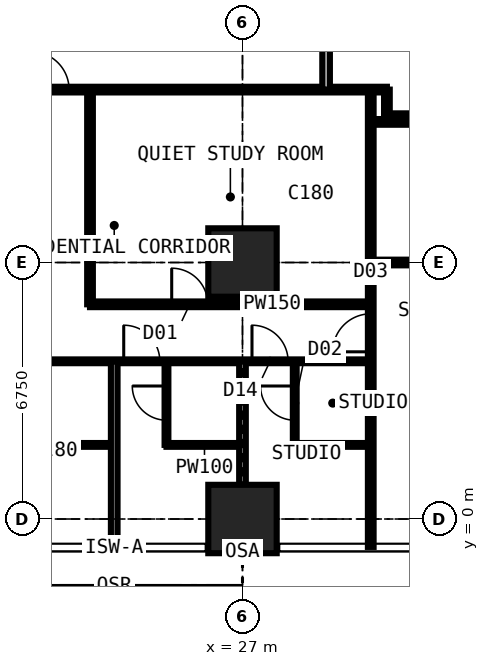
"""IFC4 building model, lengths in metres.
Left out: names, types, materials, properties, quantities, classifications, styles, units other than length and angle.
Written with IfcOpenShell. Run it as: python <this file> out.ifc"""

import sys

from ifc_helpers import new_model, si_unit, direction, frame, frame_2d, origin, origin_2d, place, context, subcontext, project, spatial, rectangle, extrude, element, fill, save


model = new_model("IFC4")
c1 = context("Model", 3, precision=1e-05, world=origin(), true_north=direction((0.0, 1.0)))
c2 = subcontext(c1, "Body", "Model", "MODEL_VIEW")
j1 = project(units=[si_unit("LENGTHUNIT", "METRE"), si_unit("PLANEANGLEUNIT", "RADIAN")], contexts=[c1])
p1 = place(None, origin())
s1 = spatial("IfcSite", under=j1, at=p1, CompositionType="ELEMENT")
p2 = place(p1, origin())
s2 = spatial("IfcBuilding", under=s1, at=p2, CompositionType="ELEMENT")
p3 = place(p2, frame((0.0, 0.0, 61.2)))
s3 = spatial("IfcBuildingStorey", under=s2, at=p3, CompositionType="ELEMENT", Elevation=61.2)
for number, where, z_axis, x_axis in (
    (1, (27.0, 0.0, 0.0), (0.0, 0.0, 1.0), (1.0, 0.0, 0.0)),
    (2, (27.0, 6.75, 0.0), (0.0, 0.0, 1.0), (1.0, 0.0, 0.0)),
):
    element("IfcColumn", number, at=place(p3, frame(where, z_axis=z_axis, x_axis=x_axis)), inside=s3, PredefinedType="COLUMN", context=c2, shape_type="SweptSolid", body=[
        extrude(rectangle(XDim=1.8, YDim=1.8, at=origin_2d()), origin(), (0.0, 0.0, 1.0), 3.6),
    ])
p4 = place(p3, frame((6.75, 4.15, 0.0), z_axis=(0.0, 0.0, 1.0), x_axis=(1.0, 0.0, 0.0)))
e3 = element("IfcWall", 3, at=p4, inside=s3, PredefinedType="PARTITIONING", context=c2, shape_type="SweptSolid", body=[
    extrude(rectangle(XDim=23.625, YDim=0.1, at=frame_2d((11.812, 0.0))), origin(), (0.0, 0.0, 1.0), 3.375),
])
p5 = place(p4, frame((0.2, 0.0, 0.0)))
e4 = element("IfcOpeningElement", 4, at=p5, cuts=e3, PredefinedType="OPENING", context=c2, shape_type="SweptSolid", body=[
    extrude(rectangle(XDim=0.95, YDim=2.2, at=frame_2d((0.475, 1.1))), frame((0.0, 0.06, 0.0), z_axis=(0.0, -1.0, 0.0), x_axis=(1.0, 0.0, 0.0)), (0.0, 0.0, 1.0), 0.12),
])
p6 = place(p4, frame((3.625, 0.0, 0.0)))
e5 = element("IfcOpeningElement", 5, at=p6, cuts=e3, PredefinedType="OPENING", context=c2, shape_type="SweptSolid", body=[
    extrude(rectangle(XDim=0.95, YDim=2.2, at=frame_2d((0.475, 1.1))), frame((0.0, 0.06, 0.0), z_axis=(0.0, -1.0, 0.0), x_axis=(1.0, 0.0, 0.0)), (0.0, 0.0, 1.0), 0.12),
])
p7 = place(p4, frame((7.0, 0.0, 0.0)))
e6 = element("IfcOpeningElement", 6, at=p7, cuts=e3, PredefinedType="OPENING", context=c2, shape_type="SweptSolid", body=[
    extrude(rectangle(XDim=0.95, YDim=2.2, at=frame_2d((0.475, 1.1))), frame((0.0, 0.06, 0.0), z_axis=(0.0, -1.0, 0.0), x_axis=(1.0, 0.0, 0.0)), (0.0, 0.0, 1.0), 0.12),
])
p8 = place(p4, frame((10.325, 0.0, 0.0)))
e7 = element("IfcOpeningElement", 7, at=p8, cuts=e3, PredefinedType="OPENING", context=c2, shape_type="SweptSolid", body=[
    extrude(rectangle(XDim=0.95, YDim=2.2, at=frame_2d((0.475, 1.1))), frame((0.0, 0.06, 0.0), z_axis=(0.0, -1.0, 0.0), x_axis=(1.0, 0.0, 0.0)), (0.0, 0.0, 1.0), 0.12),
])
p9 = place(p4, frame((13.75, 0.0, 0.0)))
e8 = element("IfcOpeningElement", 8, at=p9, cuts=e3, PredefinedType="OPENING", context=c2, shape_type="SweptSolid", body=[
    extrude(rectangle(XDim=0.95, YDim=2.2, at=frame_2d((0.475, 1.1))), frame((0.0, 0.06, 0.0), z_axis=(0.0, -1.0, 0.0), x_axis=(1.0, 0.0, 0.0)), (0.0, 0.0, 1.0), 0.12),
])
p10 = place(p4, frame((17.125, 0.0, 0.0)))
e9 = element("IfcOpeningElement", 9, at=p10, cuts=e3, PredefinedType="OPENING", context=c2, shape_type="SweptSolid", body=[
    extrude(rectangle(XDim=0.95, YDim=2.2, at=frame_2d((0.475, 1.1))), frame((0.0, 0.06, 0.0), z_axis=(0.0, -1.0, 0.0), x_axis=(1.0, 0.0, 0.0)), (0.0, 0.0, 1.0), 0.12),
])
p11 = place(p4, frame((20.5, 0.0, 0.0)))
e10 = element("IfcOpeningElement", 10, at=p11, cuts=e3, PredefinedType="OPENING", context=c2, shape_type="SweptSolid", body=[
    extrude(rectangle(XDim=0.95, YDim=2.2, at=frame_2d((0.475, 1.1))), frame((0.0, 0.06, 0.0), z_axis=(0.0, -1.0, 0.0), x_axis=(1.0, 0.0, 0.0)), (0.0, 0.0, 1.0), 0.12),
])
p12 = place(p3, frame((10.125, 11.3, 0.0), z_axis=(0.0, 0.0, 1.0), x_axis=(1.0, 0.0, 0.0)))
e11 = element("IfcWall", 11, at=p12, inside=s3, PredefinedType="PARTITIONING", context=c2, shape_type="SweptSolid", body=[
    extrude(rectangle(XDim=20.675, YDim=0.15, at=frame_2d((10.337, 0.0))), origin(), (0.0, 0.0, 1.0), 3.375),
])
p13 = place(p12, frame((5.2, 0.0, 0.0)))
e12 = element("IfcOpeningElement", 12, at=p13, cuts=e11, PredefinedType="OPENING", context=c2, shape_type="SweptSolid", body=[
    extrude(rectangle(XDim=1.0, YDim=2.2, at=frame_2d((0.5, 1.1))), frame((0.0, 0.085, 0.0), z_axis=(0.0, -1.0, 0.0), x_axis=(1.0, 0.0, 0.0)), (0.0, 0.0, 1.0), 0.17),
])
p14 = place(p12, frame((11.312, 0.0, 0.0)))
e13 = element("IfcOpeningElement", 13, at=p14, cuts=e11, PredefinedType="OPENING", context=c2, shape_type="SweptSolid", body=[
    extrude(rectangle(XDim=1.0, YDim=2.2, at=frame_2d((0.5, 1.1))), frame((0.0, 0.085, 0.0), z_axis=(0.0, -1.0, 0.0), x_axis=(1.0, 0.0, 0.0)), (0.0, 0.0, 1.0), 0.17),
])
p15 = place(p12, frame((2.425, 0.0, 0.0)))
e14 = element("IfcOpeningElement", 14, at=p15, cuts=e11, PredefinedType="OPENING", context=c2, shape_type="SweptSolid", body=[
    extrude(rectangle(XDim=0.95, YDim=2.2, at=frame_2d((0.475, 1.1))), frame((0.0, 0.085, 0.0), z_axis=(0.0, -1.0, 0.0), x_axis=(1.0, 0.0, 0.0)), (0.0, 0.0, 1.0), 0.17),
])
p16 = place(p3, frame((21.625, 1.95, 0.0), z_axis=(0.0, 0.0, 1.0), x_axis=(1.0, 0.0, 0.0)))
e15 = element("IfcWall", 15, at=p16, inside=s3, PredefinedType="PARTITIONING", context=c2, shape_type="SweptSolid", body=[
    extrude(rectangle(XDim=2.0, YDim=0.1, at=frame_2d((1.0, 0.0))), origin(), (0.0, 0.0, 1.0), 3.375),
])
p17 = place(p3, frame((22.988, 5.65, 0.0), z_axis=(0.0, 0.0, 1.0), x_axis=(1.0, 0.0, 0.0)))
e16 = element("IfcWall", 16, at=p17, inside=s3, PredefinedType="PARTITIONING", context=c2, shape_type="SweptSolid", body=[
    extrude(rectangle(XDim=7.387, YDim=0.15, at=frame_2d((3.694, 0.0))), origin(), (0.0, 0.0, 1.0), 3.375),
])
p18 = place(p17, frame((2.15, 0.0, 0.0)))
e17 = element("IfcOpeningElement", 17, at=p18, cuts=e16, PredefinedType="OPENING", context=c2, shape_type="SweptSolid", body=[
    extrude(rectangle(XDim=0.95, YDim=2.2, at=frame_2d((0.475, 1.1))), frame((0.0, 0.085, 0.0), z_axis=(0.0, -1.0, 0.0), x_axis=(1.0, 0.0, 0.0)), (0.0, 0.0, 1.0), 0.17),
])
p19 = place(p3, frame((22.988, 5.65, 0.0), z_axis=(0.0, 0.0, 1.0), x_axis=(0.0, 1.0, 0.0)))
e18 = element("IfcWall", 18, at=p19, inside=s3, PredefinedType="PARTITIONING", context=c2, shape_type="SweptSolid", body=[
    extrude(rectangle(XDim=5.65, YDim=0.15, at=frame_2d((2.825, 0.0))), origin(), (0.0, 0.0, 1.0), 3.375),
])
p20 = place(p3, frame((23.625, -0.734, 0.0), z_axis=(0.0, 0.0, 1.0), x_axis=(0.0, 1.0, 0.0)))
e19 = element("IfcWall", 19, at=p20, inside=s3, PredefinedType="PARTITIONING", context=c2, shape_type="SweptSolid", body=[
    extrude(rectangle(XDim=4.884, YDim=0.175, at=frame_2d((2.442, 0.0))), origin(), (0.0, 0.0, 1.0), 3.375),
])
p21 = place(p3, frame((25.0, 1.95, 0.0), z_axis=(0.0, 0.0, 1.0), x_axis=(0.0, 1.0, 0.0)))
e20 = element("IfcWall", 20, at=p21, inside=s3, PredefinedType="PARTITIONING", context=c2, shape_type="SweptSolid", body=[
    extrude(rectangle(XDim=2.2, YDim=0.1, at=frame_2d((1.1, 0.0))), origin(), (0.0, 0.0, 1.0), 3.375),
])
p22 = place(p21, frame((0.65, 0.0, 0.0)))
e21 = element("IfcOpeningElement", 21, at=p22, cuts=e20, PredefinedType="OPENING", context=c2, shape_type="SweptSolid", body=[
    extrude(rectangle(XDim=0.9, YDim=2.2, at=frame_2d((0.45, 1.1))), frame((0.0, 0.06, 0.0), z_axis=(0.0, -1.0, 0.0), x_axis=(1.0, 0.0, 0.0)), (0.0, 0.0, 1.0), 0.12),
])
p23 = place(p3, frame((25.0, 1.95, 0.0), z_axis=(0.0, 0.0, 1.0), x_axis=(1.0, 0.0, 0.0)))
e22 = element("IfcWall", 22, at=p23, inside=s3, PredefinedType="PARTITIONING", context=c2, shape_type="SweptSolid", body=[
    extrude(rectangle(XDim=2.0, YDim=0.1, at=frame_2d((1.0, 0.0))), origin(), (0.0, 0.0, 1.0), 3.375),
])
p24 = place(p3, frame((27.0, -0.734, 0.0), z_axis=(0.0, 0.0, 1.0), x_axis=(0.0, 1.0, 0.0)))
e23 = element("IfcWall", 23, at=p24, inside=s3, PredefinedType="PARTITIONING", context=c2, shape_type="SweptSolid", body=[
    extrude(rectangle(XDim=4.884, YDim=0.175, at=frame_2d((2.442, 0.0))), origin(), (0.0, 0.0, 1.0), 2.61),
])
p25 = place(p3, frame((28.375, 1.95, 0.0), z_axis=(0.0, 0.0, 1.0), x_axis=(0.0, 1.0, 0.0)))
e24 = element("IfcWall", 24, at=p25, inside=s3, PredefinedType="PARTITIONING", context=c2, shape_type="SweptSolid", body=[
    extrude(rectangle(XDim=2.2, YDim=0.1, at=frame_2d((1.1, 0.0))), origin(), (0.0, 0.0, 1.0), 3.375),
])
p26 = place(p25, frame((0.65, 0.0, 0.0)))
e25 = element("IfcOpeningElement", 25, at=p26, cuts=e24, PredefinedType="OPENING", context=c2, shape_type="SweptSolid", body=[
    extrude(rectangle(XDim=0.9, YDim=2.2, at=frame_2d((0.45, 1.1))), frame((0.0, 0.06, 0.0), z_axis=(0.0, -1.0, 0.0), x_axis=(1.0, 0.0, 0.0)), (0.0, 0.0, 1.0), 0.12),
])
p27 = place(p3, frame((28.375, 1.95, 0.0), z_axis=(0.0, 0.0, 1.0), x_axis=(1.0, 0.0, 0.0)))
e26 = element("IfcWall", 26, at=p27, inside=s3, PredefinedType="PARTITIONING", context=c2, shape_type="SweptSolid", body=[
    extrude(rectangle(XDim=2.0, YDim=0.1, at=frame_2d((1.0, 0.0))), origin(), (0.0, 0.0, 1.0), 3.375),
])
p28 = place(p3, frame((29.2, 11.3, 0.0), z_axis=(0.0, 0.0, 1.0), x_axis=(0.0, 1.0, 0.0)))
e27 = element("IfcWall", 27, at=p28, inside=s3, PredefinedType="PARTITIONING", context=c2, shape_type="SweptSolid", body=[
    extrude(rectangle(XDim=17.9, YDim=0.2, at=frame_2d((8.95, 0.0))), origin(), (0.0, 0.0, 1.0), 3.375),
])
p29 = place(p28, frame((8.35, 0.0, 0.0)))
e28 = element("IfcOpeningElement", 28, at=p29, cuts=e27, PredefinedType="OPENING", context=c2, shape_type="SweptSolid", body=[
    extrude(rectangle(XDim=1.2, YDim=2.2, at=frame_2d((0.6, 1.1))), frame((0.0, 0.11, 0.0), z_axis=(0.0, -1.0, 0.0), x_axis=(1.0, 0.0, 0.0)), (0.0, 0.0, 1.0), 0.22),
])
p30 = place(p3, frame((30.375, -0.734, 0.0), z_axis=(0.0, 0.0, 1.0), x_axis=(0.0, 1.0, 0.0)))
e29 = element("IfcWall", 29, at=p30, inside=s3, PredefinedType="PARTITIONING", context=c2, shape_type="SweptSolid", body=[
    extrude(rectangle(XDim=12.034, YDim=0.15, at=frame_2d((6.017, 0.0))), origin(), (0.0, 0.0, 1.0), 3.375),
])
p31 = place(p30, frame((5.134, 0.0, 0.0)))
e30 = element("IfcOpeningElement", 30, at=p31, cuts=e29, PredefinedType="OPENING", context=c2, shape_type="SweptSolid", body=[
    extrude(rectangle(XDim=1.0, YDim=2.2, at=frame_2d((0.5, 1.1))), frame((0.0, 0.085, 0.0), z_axis=(0.0, -1.0, 0.0), x_axis=(1.0, 0.0, 0.0)), (0.0, 0.0, 1.0), 0.17),
])
p32 = place(p3, frame((30.375, 6.75, 0.0), z_axis=(0.0, 0.0, 1.0), x_axis=(1.0, 0.0, 0.0)))
e31 = element("IfcWall", 31, at=p32, inside=s3, PredefinedType="PARTITIONING", context=c2, shape_type="SweptSolid", body=[
    extrude(rectangle(XDim=5.975, YDim=0.15, at=frame_2d((2.988, 0.0))), origin(), (0.0, 0.0, 1.0), 2.877),
])
p33 = place(p3, frame((30.375, 10.45, 0.0), z_axis=(0.0, 0.0, 1.0), x_axis=(1.0, 0.0, 0.0)))
e32 = element("IfcWall", 32, at=p33, inside=s3, PredefinedType="PARTITIONING", context=c2, shape_type="SweptSolid", body=[
    extrude(rectangle(XDim=4.475, YDim=0.15, at=frame_2d((2.238, 0.0))), origin(), (0.0, 0.0, 1.0), 3.375),
])
p34 = place(p33, frame((2.35, 0.0, 0.0)))
e33 = element("IfcOpeningElement", 33, at=p34, cuts=e32, PredefinedType="OPENING", context=c2, shape_type="SweptSolid", body=[
    extrude(rectangle(XDim=0.95, YDim=2.2, at=frame_2d((0.475, 1.1))), frame((0.0, 0.085, 0.0), z_axis=(0.0, -1.0, 0.0), x_axis=(1.0, 0.0, 0.0)), (0.0, 0.0, 1.0), 0.17),
])
p35 = place(p3, frame((30.8, 10.6, 0.0), z_axis=(0.0, 0.0, 1.0), x_axis=(0.0, 1.0, 0.0)))
e34 = element("IfcWall", 34, at=p35, inside=s3, PredefinedType="PARTITIONING", context=c2, shape_type="SweptSolid", body=[
    extrude(rectangle(XDim=0.7, YDim=0.15, at=frame_2d((0.35, 0.0))), origin(), (0.0, 0.0, 1.0), 3.375),
])
p36 = place(p3, frame((30.8, 10.6, 0.0), z_axis=(0.0, 0.0, 1.0), x_axis=(1.0, 0.0, 0.0)))
e35 = element("IfcWall", 35, at=p36, inside=s3, PredefinedType="PARTITIONING", context=c2, shape_type="SweptSolid", body=[
    extrude(rectangle(XDim=1.85, YDim=0.15, at=frame_2d((0.925, 0.0))), origin(), (0.0, 0.0, 1.0), 3.375),
])
p37 = place(p10, origin())
e36 = element("IfcDoor", 36, at=p37, inside=s3, OperationType="SINGLE_SWING_LEFT", PredefinedType="DOOR", context=c2, shape_type="SweptSolid", body=[
    extrude(rectangle(XDim=0.95, YDim=2.2, at=frame_2d((0.475, 1.1))), frame((0.0, 0.025, 0.0), z_axis=(0.0, -1.0, 0.0), x_axis=(1.0, 0.0, 0.0)), (0.0, 0.0, 1.0), 0.05),
])
fill(e9, e36)
p38 = place(p22, origin())
e37 = element("IfcDoor", 37, at=p38, inside=s3, OperationType="SINGLE_SWING_RIGHT", PredefinedType="DOOR", context=c2, shape_type="SweptSolid", body=[
    extrude(rectangle(XDim=0.9, YDim=2.2, at=frame_2d((0.45, 1.1))), frame((0.0, 0.025, 0.0), z_axis=(0.0, -1.0, 0.0), x_axis=(1.0, 0.0, 0.0)), (0.0, 0.0, 1.0), 0.05),
])
fill(e21, e37)
p39 = place(p11, origin())
e38 = element("IfcDoor", 38, at=p39, inside=s3, OperationType="SINGLE_SWING_LEFT", PredefinedType="DOOR", context=c2, shape_type="SweptSolid", body=[
    extrude(rectangle(XDim=0.95, YDim=2.2, at=frame_2d((0.475, 1.1))), frame((0.0, 0.025, 0.0), z_axis=(0.0, -1.0, 0.0), x_axis=(1.0, 0.0, 0.0)), (0.0, 0.0, 1.0), 0.05),
])
fill(e10, e38)
p40 = place(p26, origin())
e39 = element("IfcDoor", 39, at=p40, inside=s3, OperationType="SINGLE_SWING_RIGHT", PredefinedType="DOOR", context=c2, shape_type="SweptSolid", body=[
    extrude(rectangle(XDim=0.9, YDim=2.2, at=frame_2d((0.45, 1.1))), frame((0.0, 0.025, 0.0), z_axis=(0.0, -1.0, 0.0), x_axis=(1.0, 0.0, 0.0)), (0.0, 0.0, 1.0), 0.05),
])
fill(e25, e39)
p41 = place(p14, origin())
e40 = element("IfcDoor", 40, at=p41, inside=s3, OperationType="SINGLE_SWING_LEFT", PredefinedType="DOOR", context=c2, shape_type="SweptSolid", body=[
    extrude(rectangle(XDim=1.0, YDim=2.2, at=frame_2d((0.5, 1.1))), frame((0.0, 0.025, 0.0), z_axis=(0.0, -1.0, 0.0), x_axis=(1.0, 0.0, 0.0)), (0.0, 0.0, 1.0), 0.05),
])
fill(e13, e40)
p42 = place(p18, origin())
e41 = element("IfcDoor", 41, at=p42, inside=s3, OperationType="SINGLE_SWING_LEFT", PredefinedType="DOOR", context=c2, shape_type="SweptSolid", body=[
    extrude(rectangle(XDim=0.95, YDim=2.2, at=frame_2d((0.475, 1.1))), frame((0.0, 0.025, 0.0), z_axis=(0.0, -1.0, 0.0), x_axis=(1.0, 0.0, 0.0)), (0.0, 0.0, 1.0), 0.05),
])
fill(e17, e41)
p43 = place(p31, origin())
e42 = element("IfcDoor", 42, at=p43, inside=s3, OperationType="SINGLE_SWING_LEFT", PredefinedType="DOOR", context=c2, shape_type="SweptSolid", body=[
    extrude(rectangle(XDim=1.0, YDim=2.2, at=frame_2d((0.5, 1.1))), frame((0.0, 0.025, 0.0), z_axis=(0.0, -1.0, 0.0), x_axis=(1.0, 0.0, 0.0)), (0.0, 0.0, 1.0), 0.05),
])
fill(e30, e42)
save(model, sys.argv[1])
